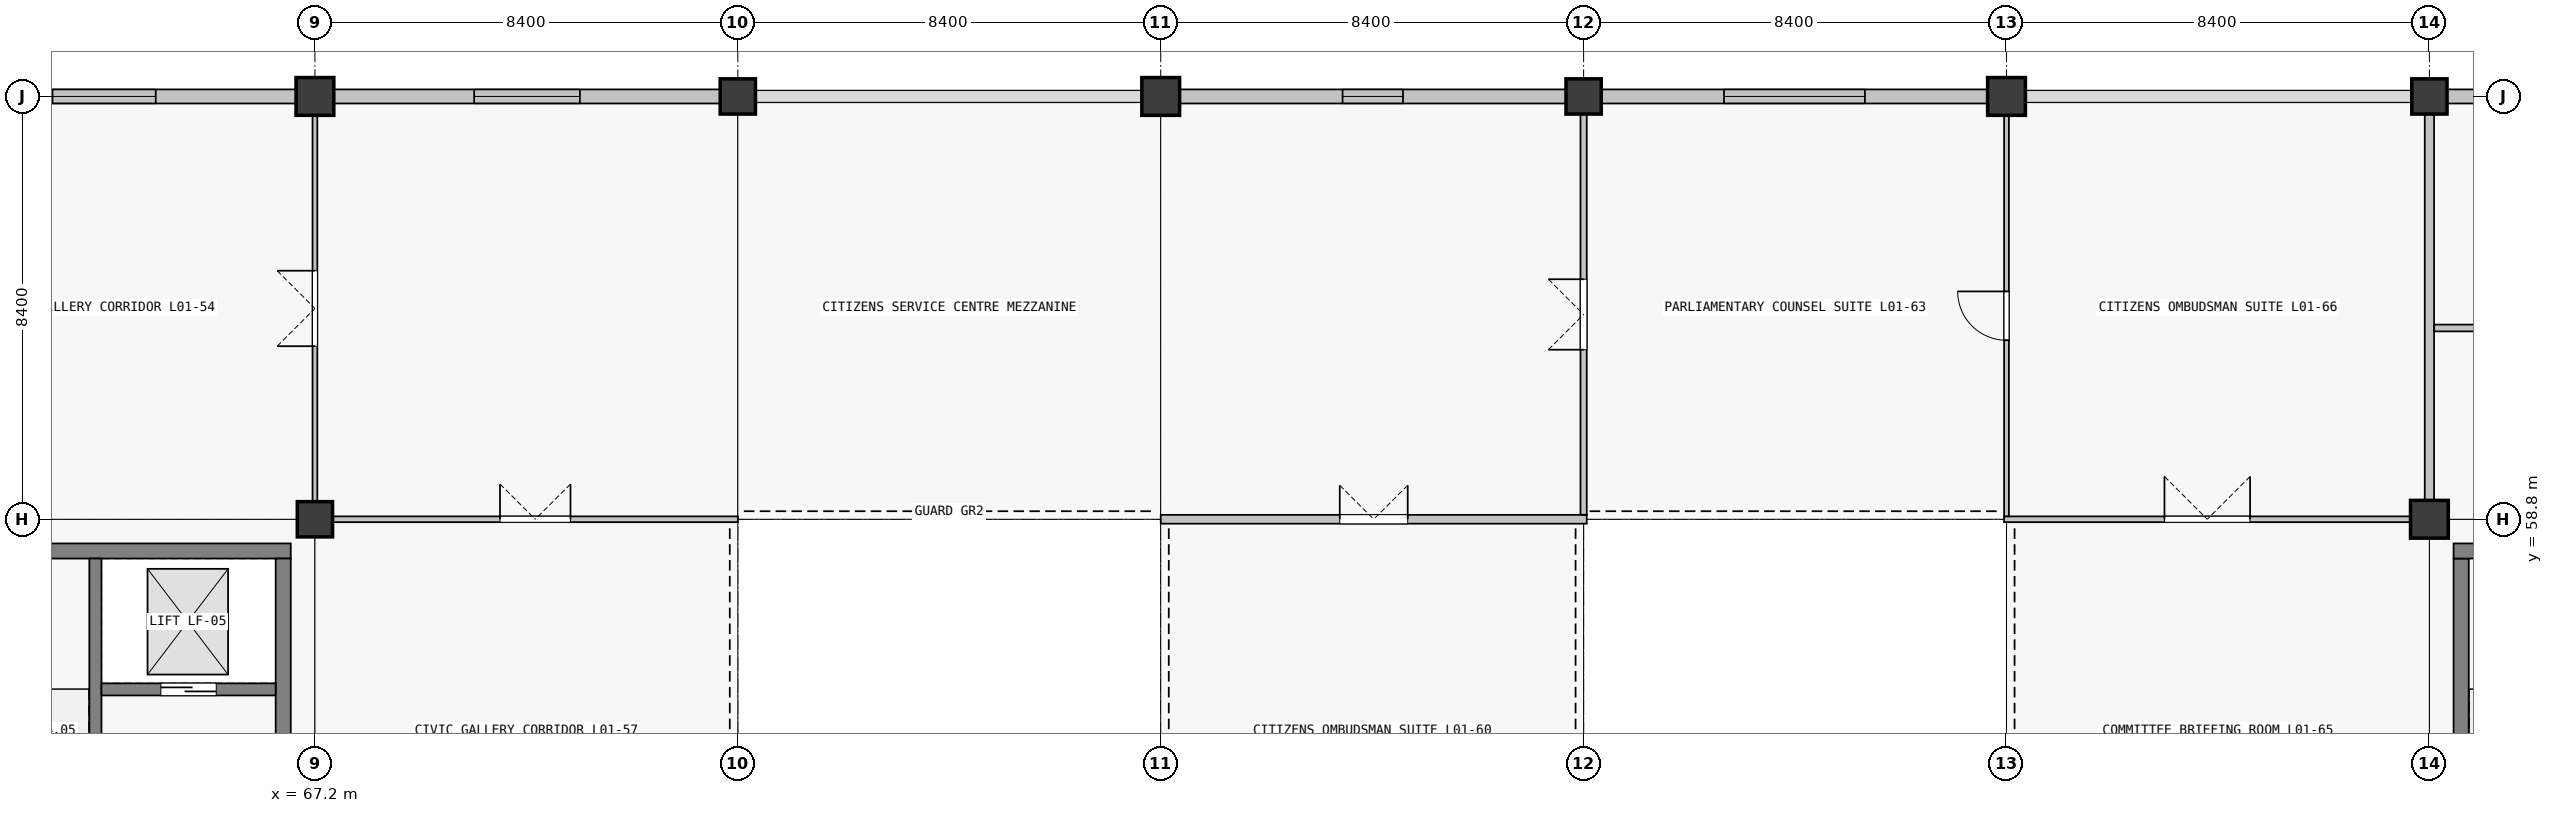
"""IFC4 building model, lengths in metres.
Left out: names, types, materials, properties, quantities, classifications, styles, units other than length and angle.
Written with IfcOpenShell. Run it as: python <this file> out.ifc"""

import sys

from ifc_helpers import new_model, si_unit, direction, frame, frame_2d, origin, origin_2d, place, context, subcontext, project, spatial, rectangle, extrude, element, fill, save


model = new_model("IFC4")
c1 = context("Model", 3, precision=1e-05, world=origin(), true_north=direction((0.0, 1.0)))
c2 = subcontext(c1, "Body", "Model", "MODEL_VIEW")
j1 = project(units=[si_unit("LENGTHUNIT", "METRE"), si_unit("PLANEANGLEUNIT", "RADIAN")], contexts=[c1])
p1 = place(None, origin())
s1 = spatial("IfcSite", under=j1, at=p1, CompositionType="ELEMENT")
p2 = place(p1, origin())
s2 = spatial("IfcBuilding", under=s1, at=p2, CompositionType="ELEMENT")
p3 = place(p2, frame((0.0, 0.0, 5.76)))
s3 = spatial("IfcBuildingStorey", under=s2, at=p3, CompositionType="ELEMENT", Elevation=5.76)
p4 = place(p3, frame((67.2, 58.8, 0.0), z_axis=(0.0, 0.0, 1.0), x_axis=(1.0, 0.0, 0.0)))
e1 = element("IfcColumn", 1, at=p4, inside=s3, PredefinedType="COLUMN", context=c2, shape_type="SweptSolid", body=[
    extrude(rectangle(XDim=0.7, YDim=0.7, at=origin_2d()), origin(), (0.0, 0.0, 1.0), 4.5),
])
p5 = place(p3, frame((67.2, 67.2, 0.0), z_axis=(0.0, 0.0, 1.0), x_axis=(1.0, 0.0, 0.0)))
e2 = element("IfcColumn", 2, at=p5, inside=s3, PredefinedType="COLUMN", context=c2, shape_type="SweptSolid", body=[
    extrude(rectangle(XDim=0.75, YDim=0.75, at=origin_2d()), origin(), (0.0, 0.0, 1.0), 4.5),
])
p6 = place(p3, frame((75.6, 67.2, 0.0), z_axis=(0.0, 0.0, 1.0), x_axis=(1.0, 0.0, 0.0)))
e3 = element("IfcColumn", 3, at=p6, inside=s3, PredefinedType="COLUMN", context=c2, shape_type="SweptSolid", body=[
    extrude(rectangle(XDim=0.7, YDim=0.7, at=origin_2d()), origin(), (0.0, 0.0, 1.0), 4.5),
])
p7 = place(p3, frame((84.0, 67.2, 0.0), z_axis=(0.0, 0.0, 1.0), x_axis=(1.0, 0.0, 0.0)))
e4 = element("IfcColumn", 4, at=p7, inside=s3, PredefinedType="COLUMN", context=c2, shape_type="SweptSolid", body=[
    extrude(rectangle(XDim=0.75, YDim=0.75, at=origin_2d()), origin(), (0.0, 0.0, 1.0), 4.5),
])
p8 = place(p3, frame((92.4, 67.2, 0.0), z_axis=(0.0, 0.0, 1.0), x_axis=(1.0, 0.0, 0.0)))
e5 = element("IfcColumn", 5, at=p8, inside=s3, PredefinedType="COLUMN", context=c2, shape_type="SweptSolid", body=[
    extrude(rectangle(XDim=0.7, YDim=0.7, at=origin_2d()), origin(), (0.0, 0.0, 1.0), 4.5),
])
for number, where, z_axis, x_axis in (
    (6, (100.8, 67.2, 0.0), (0.0, 0.0, 1.0), (1.0, 0.0, 0.0)),
    (7, (109.2, 58.8, 0.0), (0.0, 0.0, 1.0), (1.0, 0.0, 0.0)),
):
    element("IfcColumn", number, at=place(p3, frame(where, z_axis=z_axis, x_axis=x_axis)), inside=s3, PredefinedType="COLUMN", context=c2, shape_type="SweptSolid", body=[
        extrude(rectangle(XDim=0.75, YDim=0.75, at=origin_2d()), origin(), (0.0, 0.0, 1.0), 4.5),
    ])
p9 = place(p3, frame((109.2, 67.2, 0.0), z_axis=(0.0, 0.0, 1.0), x_axis=(1.0, 0.0, 0.0)))
e8 = element("IfcColumn", 8, at=p9, inside=s3, PredefinedType="COLUMN", context=c2, shape_type="SweptSolid", body=[
    extrude(rectangle(XDim=0.7, YDim=0.7, at=origin_2d()), origin(), (0.0, 0.0, 1.0), 4.5),
])
p10 = place(p3, frame((59.201, 67.2, 0.0), z_axis=(0.0, 0.0, 1.0), x_axis=(1.0, 0.0, 0.0)))
e9 = element("IfcWall", 9, at=p10, inside=s3, PredefinedType="SOLIDWALL", context=c2, shape_type="SweptSolid", body=[
    extrude(rectangle(XDim=7.623, YDim=0.28, at=frame_2d((3.812, 0.0))), origin(), (0.0, 0.0, 1.0), 3.4),
])
p11 = place(p10, frame((2.787, 0.0, 0.9)))
e10 = element("IfcOpeningElement", 10, at=p11, cuts=e9, PredefinedType="OPENING", context=c2, shape_type="SweptSolid", body=[
    extrude(rectangle(XDim=2.05, YDim=1.45, at=frame_2d((1.025, 0.725))), frame((0.0, 0.14, 0.0), z_axis=(0.0, -1.0, 0.0), x_axis=(1.0, 0.0, 0.0)), (0.0, 0.0, 1.0), 0.28),
])
p12 = place(p3, frame((67.576, 67.2, 0.0), z_axis=(0.0, 0.0, 1.0), x_axis=(1.0, 0.0, 0.0)))
e11 = element("IfcWall", 11, at=p12, inside=s3, PredefinedType="SOLIDWALL", context=c2, shape_type="SweptSolid", body=[
    extrude(rectangle(XDim=7.673, YDim=0.28, at=frame_2d((3.836, 0.0))), origin(), (0.0, 0.0, 1.0), 3.4),
])
p13 = place(p12, frame((2.787, 0.0, 0.9)))
e12 = element("IfcOpeningElement", 12, at=p13, cuts=e11, PredefinedType="OPENING", context=c2, shape_type="SweptSolid", body=[
    extrude(rectangle(XDim=2.1, YDim=1.8, at=frame_2d((1.05, 0.9))), frame((0.0, 0.14, 0.0), z_axis=(0.0, -1.0, 0.0), x_axis=(1.0, 0.0, 0.0)), (0.0, 0.0, 1.0), 0.28),
])
p14 = place(p3, frame((84.376, 67.2, 0.0), z_axis=(0.0, 0.0, 1.0), x_axis=(1.0, 0.0, 0.0)))
e13 = element("IfcWall", 13, at=p14, inside=s3, PredefinedType="SOLIDWALL", context=c2, shape_type="SweptSolid", body=[
    extrude(rectangle(XDim=7.673, YDim=0.28, at=frame_2d((3.836, 0.0))), origin(), (0.0, 0.0, 1.0), 3.4),
])
p15 = place(p14, frame((3.236, 0.0, 0.9)))
e14 = element("IfcOpeningElement", 14, at=p15, cuts=e13, PredefinedType="OPENING", context=c2, shape_type="SweptSolid", body=[
    extrude(rectangle(XDim=1.2, YDim=2.1, at=frame_2d((0.6, 1.05))), frame((0.0, 0.14, 0.0), z_axis=(0.0, -1.0, 0.0), x_axis=(1.0, 0.0, 0.0)), (0.0, 0.0, 1.0), 0.28),
])
p16 = place(p3, frame((92.751, 67.2, 0.0), z_axis=(0.0, 0.0, 1.0), x_axis=(1.0, 0.0, 0.0)))
e15 = element("IfcWall", 15, at=p16, inside=s3, PredefinedType="SOLIDWALL", context=c2, shape_type="SweptSolid", body=[
    extrude(rectangle(XDim=7.673, YDim=0.28, at=frame_2d((3.836, 0.0))), origin(), (0.0, 0.0, 1.0), 3.4),
])
p17 = place(p16, frame((2.437, 0.0, 0.9)))
e16 = element("IfcOpeningElement", 16, at=p17, cuts=e15, PredefinedType="OPENING", context=c2, shape_type="SweptSolid", body=[
    extrude(rectangle(XDim=2.8, YDim=1.75, at=frame_2d((1.4, 0.875))), frame((0.0, 0.14, 0.0), z_axis=(0.0, -1.0, 0.0), x_axis=(1.0, 0.0, 0.0)), (0.0, 0.0, 1.0), 0.28),
])
p18 = place(p3, frame((109.551, 67.2, 0.0), z_axis=(0.0, 0.0, 1.0), x_axis=(1.0, 0.0, 0.0)))
e17 = element("IfcWall", 17, at=p18, inside=s3, PredefinedType="SOLIDWALL", context=c2, shape_type="SweptSolid", body=[
    extrude(rectangle(XDim=7.723, YDim=0.28, at=frame_2d((3.861, 0.0))), origin(), (0.0, 0.0, 1.0), 3.4),
])
p19 = place(p18, frame((3.162, 0.0, 0.9)))
e18 = element("IfcOpeningElement", 18, at=p19, cuts=e17, PredefinedType="OPENING", context=c2, shape_type="SweptSolid", body=[
    extrude(rectangle(XDim=1.4, YDim=1.75, at=frame_2d((0.7, 0.875))), frame((0.0, 0.14, 0.0), z_axis=(0.0, -1.0, 0.0), x_axis=(1.0, 0.0, 0.0)), (0.0, 0.0, 1.0), 0.28),
])
p20 = place(p3, frame((59.28, 58.17, 0.0), z_axis=(0.0, 0.0, 1.0), x_axis=(1.0, 0.0, 0.0)))
e19 = element("IfcWall", 19, at=p20, inside=s3, PredefinedType="SHEAR", context=c2, shape_type="SweptSolid", body=[
    extrude(rectangle(XDim=7.44, YDim=0.3, at=frame_2d((3.72, 0.0))), origin(), (0.0, 0.0, 1.0), 4.5),
])
p21 = place(p3, frame((66.57, 58.02, 0.0), z_axis=(0.0, 0.0, 1.0), x_axis=(0.0, -1.0, 0.0)))
e20 = element("IfcWall", 20, at=p21, inside=s3, PredefinedType="SHEAR", context=c2, shape_type="SweptSolid", body=[
    extrude(rectangle(XDim=6.84, YDim=0.3, at=frame_2d((3.42, 0.0))), origin(), (0.0, 0.0, 1.0), 4.5),
])
p22 = place(p21, frame((3.97, 0.0, 0.0)))
e21 = element("IfcOpeningElement", 21, at=p22, cuts=e20, PredefinedType="OPENING", context=c2, shape_type="SweptSolid", body=[
    extrude(rectangle(XDim=1.5, YDim=2.15, at=frame_2d((0.75, 1.075))), frame((0.0, 0.15, 0.0), z_axis=(0.0, -1.0, 0.0), x_axis=(1.0, 0.0, 0.0)), (0.0, 0.0, 1.0), 0.3),
])
p23 = place(p3, frame((62.84, 51.18, 0.0), z_axis=(0.0, 0.0, 1.0), x_axis=(0.0, 1.0, 0.0)))
e22 = element("IfcWall", 22, at=p23, inside=s3, PredefinedType="SHEAR", context=c2, shape_type="SweptSolid", body=[
    extrude(rectangle(XDim=6.84, YDim=0.24, at=frame_2d((3.42, 0.0))), origin(), (0.0, 0.0, 1.0), 4.5),
])
p24 = place(p23, frame((0.12, 0.0, 0.0)))
e23 = element("IfcOpeningElement", 23, at=p24, cuts=e22, PredefinedType="OPENING", context=c2, shape_type="SweptSolid", body=[
    extrude(rectangle(XDim=1.0, YDim=2.15, at=frame_2d((0.5, 1.075))), frame((0.0, 0.12, 0.0), z_axis=(0.0, -1.0, 0.0), x_axis=(1.0, 0.0, 0.0)), (0.0, 0.0, 1.0), 0.24),
])
p25 = place(p3, frame((62.96, 55.42, 0.0), z_axis=(0.0, 0.0, 1.0), x_axis=(1.0, 0.0, 0.0)))
e24 = element("IfcWall", 24, at=p25, inside=s3, PredefinedType="SHEAR", context=c2, shape_type="SweptSolid", body=[
    extrude(rectangle(XDim=3.46, YDim=0.24, at=frame_2d((1.73, 0.0))), origin(), (0.0, 0.0, 1.0), 4.5),
])
p26 = place(p25, frame((1.18, 0.0, 0.0)))
e25 = element("IfcOpeningElement", 25, at=p26, cuts=e24, PredefinedType="OPENING", context=c2, shape_type="SweptSolid", body=[
    extrude(rectangle(XDim=1.1, YDim=2.15, at=frame_2d((0.55, 1.075))), frame((0.0, 0.12, 0.0), z_axis=(0.0, -1.0, 0.0), x_axis=(1.0, 0.0, 0.0)), (0.0, 0.0, 1.0), 0.24),
])
p27 = place(p3, frame((109.83, 51.18, 0.0), z_axis=(0.0, 0.0, 1.0), x_axis=(0.0, 1.0, 0.0)))
e26 = element("IfcWall", 26, at=p27, inside=s3, PredefinedType="SHEAR", context=c2, shape_type="SweptSolid", body=[
    extrude(rectangle(XDim=6.84, YDim=0.3, at=frame_2d((3.42, 0.0))), origin(), (0.0, 0.0, 1.0), 4.5),
])
p28 = place(p3, frame((109.68, 58.17, 0.0), z_axis=(0.0, 0.0, 1.0), x_axis=(1.0, 0.0, 0.0)))
e27 = element("IfcWall", 27, at=p28, inside=s3, PredefinedType="SHEAR", context=c2, shape_type="SweptSolid", body=[
    extrude(rectangle(XDim=7.44, YDim=0.3, at=frame_2d((3.72, 0.0))), origin(), (0.0, 0.0, 1.0), 4.5),
])
p29 = place(p3, frame((67.552, 58.8, 0.0), z_axis=(0.0, 0.0, 1.0), x_axis=(1.0, 0.0, 0.0)))
e28 = element("IfcWall", 28, at=p29, inside=s3, PredefinedType="PARTITIONING", context=c2, shape_type="SweptSolid", body=[
    extrude(rectangle(XDim=8.048, YDim=0.115, at=frame_2d((4.024, 0.0))), origin(), (0.0, 0.0, 1.0), 2.4),
])
p30 = place(p29, frame((3.324, 0.0, 0.0)))
e29 = element("IfcOpeningElement", 29, at=p30, cuts=e28, PredefinedType="OPENING", context=c2, shape_type="SweptSolid", body=[
    extrude(rectangle(XDim=1.4, YDim=2.22, at=frame_2d((0.7, 1.11))), frame((0.0, 0.058, 0.0), z_axis=(0.0, -1.0, 0.0), x_axis=(1.0, 0.0, 0.0)), (0.0, 0.0, 1.0), 0.115),
])
p31 = place(p3, frame((84.0, 58.8, 0.0), z_axis=(0.0, 0.0, 1.0), x_axis=(1.0, 0.0, 0.0)))
e30 = element("IfcWall", 30, at=p31, inside=s3, PredefinedType="PARTITIONING", context=c2, shape_type="SweptSolid", body=[
    extrude(rectangle(XDim=8.462, YDim=0.175, at=frame_2d((4.231, 0.0))), origin(), (0.0, 0.0, 1.0), 2.4),
])
p32 = place(p31, frame((3.556, 0.0, 0.0)))
e31 = element("IfcOpeningElement", 31, at=p32, cuts=e30, PredefinedType="OPENING", context=c2, shape_type="SweptSolid", body=[
    extrude(rectangle(XDim=1.35, YDim=2.2, at=frame_2d((0.675, 1.1))), frame((0.0, 0.087, 0.0), z_axis=(0.0, -1.0, 0.0), x_axis=(1.0, 0.0, 0.0)), (0.0, 0.0, 1.0), 0.175),
])
p33 = place(p3, frame((100.752, 58.8, 0.0), z_axis=(0.0, 0.0, 1.0), x_axis=(1.0, 0.0, 0.0)))
e32 = element("IfcWall", 32, at=p33, inside=s3, PredefinedType="PARTITIONING", context=c2, shape_type="SweptSolid", body=[
    extrude(rectangle(XDim=8.071, YDim=0.115, at=frame_2d((4.035, 0.0))), origin(), (0.0, 0.0, 1.0), 2.4),
])
p34 = place(p33, frame((3.185, 0.0, 0.0)))
e33 = element("IfcOpeningElement", 33, at=p34, cuts=e32, PredefinedType="OPENING", context=c2, shape_type="SweptSolid", body=[
    extrude(rectangle(XDim=1.7, YDim=2.22, at=frame_2d((0.85, 1.11))), frame((0.0, 0.058, 0.0), z_axis=(0.0, -1.0, 0.0), x_axis=(1.0, 0.0, 0.0)), (0.0, 0.0, 1.0), 0.115),
])
p35 = place(p3, frame((67.2, 59.152, 0.0), z_axis=(0.0, 0.0, 1.0), x_axis=(0.0, 1.0, 0.0)))
e34 = element("IfcWall", 34, at=p35, inside=s3, PredefinedType="PARTITIONING", context=c2, shape_type="SweptSolid", body=[
    extrude(rectangle(XDim=7.671, YDim=0.095, at=frame_2d((3.835, 0.0))), origin(), (0.0, 0.0, 1.0), 2.4),
])
p36 = place(p35, frame((3.086, 0.0, 0.0)))
e35 = element("IfcOpeningElement", 35, at=p36, cuts=e34, PredefinedType="OPENING", context=c2, shape_type="SweptSolid", body=[
    extrude(rectangle(XDim=1.5, YDim=2.22, at=frame_2d((0.75, 1.11))), frame((0.0, 0.047, 0.0), z_axis=(0.0, -1.0, 0.0), x_axis=(1.0, 0.0, 0.0)), (0.0, 0.0, 1.0), 0.095),
])
p37 = place(p3, frame((92.4, 58.889, 0.0), z_axis=(0.0, 0.0, 1.0), x_axis=(0.0, 1.0, 0.0)))
e36 = element("IfcWall", 36, at=p37, inside=s3, PredefinedType="PARTITIONING", context=c2, shape_type="SweptSolid", body=[
    extrude(rectangle(XDim=7.958, YDim=0.125, at=frame_2d((3.979, 0.0))), origin(), (0.0, 0.0, 1.0), 2.4),
])
p38 = place(p37, frame((3.279, 0.0, 0.0)))
e37 = element("IfcOpeningElement", 37, at=p38, cuts=e36, PredefinedType="OPENING", context=c2, shape_type="SweptSolid", body=[
    extrude(rectangle(XDim=1.4, YDim=2.22, at=frame_2d((0.7, 1.11))), frame((0.0, 0.062, 0.0), z_axis=(0.0, -1.0, 0.0), x_axis=(1.0, 0.0, 0.0)), (0.0, 0.0, 1.0), 0.125),
])
p39 = place(p3, frame((100.8, 58.86, 0.0), z_axis=(0.0, 0.0, 1.0), x_axis=(0.0, 1.0, 0.0)))
e38 = element("IfcWall", 38, at=p39, inside=s3, PredefinedType="PARTITIONING", context=c2, shape_type="SweptSolid", body=[
    extrude(rectangle(XDim=7.963, YDim=0.095, at=frame_2d((3.982, 0.0))), origin(), (0.0, 0.0, 1.0), 2.4),
])
p40 = place(p39, frame((3.497, 0.0, 0.0)))
e39 = element("IfcOpeningElement", 39, at=p40, cuts=e38, PredefinedType="OPENING", context=c2, shape_type="SweptSolid", body=[
    extrude(rectangle(XDim=0.97, YDim=2.12, at=frame_2d((0.485, 1.06))), frame((0.0, 0.047, 0.0), z_axis=(0.0, -1.0, 0.0), x_axis=(1.0, 0.0, 0.0)), (0.0, 0.0, 1.0), 0.095),
])
p41 = place(p3, frame((109.2, 59.177, 0.0), z_axis=(0.0, 0.0, 1.0), x_axis=(0.0, 1.0, 0.0)))
e40 = element("IfcWall", 40, at=p41, inside=s3, PredefinedType="PARTITIONING", context=c2, shape_type="SweptSolid", body=[
    extrude(rectangle(XDim=7.671, YDim=0.185, at=frame_2d((3.835, 0.0))), origin(), (0.0, 0.0, 1.0), 2.4),
])
p42 = place(p3, frame((109.294, 62.6, 0.0), z_axis=(0.0, 0.0, 1.0), x_axis=(1.0, 0.0, 0.0)))
e41 = element("IfcWall", 41, at=p42, inside=s3, PredefinedType="PARTITIONING", context=c2, shape_type="SweptSolid", body=[
    extrude(rectangle(XDim=8.226, YDim=0.135, at=frame_2d((4.113, 0.0))), origin(), (0.0, 0.0, 1.0), 2.4),
])
p43 = place(p11, origin())
e42 = element("IfcWindow", 42, at=p43, inside=s3, PartitioningType="SINGLE_PANEL", PredefinedType="WINDOW", context=c2, shape_type="SweptSolid", body=[
    extrude(rectangle(XDim=2.05, YDim=1.45, at=frame_2d((1.025, 0.725))), frame((0.0, 0.03, 0.0), z_axis=(0.0, -1.0, 0.0), x_axis=(1.0, 0.0, 0.0)), (0.0, 0.0, 1.0), 0.06),
])
fill(e10, e42)
p44 = place(p13, origin())
e43 = element("IfcWindow", 43, at=p44, inside=s3, PartitioningType="SINGLE_PANEL", PredefinedType="WINDOW", context=c2, shape_type="SweptSolid", body=[
    extrude(rectangle(XDim=2.1, YDim=1.8, at=frame_2d((1.05, 0.9))), frame((0.0, 0.03, 0.0), z_axis=(0.0, -1.0, 0.0), x_axis=(1.0, 0.0, 0.0)), (0.0, 0.0, 1.0), 0.06),
])
fill(e12, e43)
p45 = place(p15, origin())
e44 = element("IfcWindow", 44, at=p45, inside=s3, PartitioningType="SINGLE_PANEL", PredefinedType="WINDOW", context=c2, shape_type="SweptSolid", body=[
    extrude(rectangle(XDim=1.2, YDim=2.1, at=frame_2d((0.6, 1.05))), frame((0.0, 0.03, 0.0), z_axis=(0.0, -1.0, 0.0), x_axis=(1.0, 0.0, 0.0)), (0.0, 0.0, 1.0), 0.06),
])
fill(e14, e44)
p46 = place(p17, origin())
e45 = element("IfcWindow", 45, at=p46, inside=s3, PartitioningType="SINGLE_PANEL", PredefinedType="WINDOW", context=c2, shape_type="SweptSolid", body=[
    extrude(rectangle(XDim=2.8, YDim=1.75, at=frame_2d((1.4, 0.875))), frame((0.0, 0.03, 0.0), z_axis=(0.0, -1.0, 0.0), x_axis=(1.0, 0.0, 0.0)), (0.0, 0.0, 1.0), 0.06),
])
fill(e16, e45)
p47 = place(p26, origin())
e46 = element("IfcDoor", 46, at=p47, inside=s3, OperationType="DOUBLE_DOOR_SLIDING", PredefinedType="DOOR", context=c2, shape_type="SweptSolid", body=[
    extrude(rectangle(XDim=1.1, YDim=2.15, at=frame_2d((0.55, 1.075))), frame((0.0, 0.025, 0.0), z_axis=(0.0, -1.0, 0.0), x_axis=(1.0, 0.0, 0.0)), (0.0, 0.0, 1.0), 0.05),
])
fill(e25, e46)
p48 = place(p30, origin())
e47 = element("IfcDoor", 47, at=p48, inside=s3, OperationType="DOUBLE_DOOR_SINGLE_SWING", PredefinedType="DOOR", context=c2, shape_type="SweptSolid", body=[
    extrude(rectangle(XDim=1.4, YDim=2.22, at=frame_2d((0.7, 1.11))), frame((0.0, 0.025, 0.0), z_axis=(0.0, -1.0, 0.0), x_axis=(1.0, 0.0, 0.0)), (0.0, 0.0, 1.0), 0.05),
])
fill(e29, e47)
p49 = place(p32, origin())
e48 = element("IfcDoor", 48, at=p49, inside=s3, OperationType="DOUBLE_DOOR_SINGLE_SWING", PredefinedType="DOOR", context=c2, shape_type="SweptSolid", body=[
    extrude(rectangle(XDim=1.35, YDim=2.2, at=frame_2d((0.675, 1.1))), frame((0.0, 0.025, 0.0), z_axis=(0.0, -1.0, 0.0), x_axis=(1.0, 0.0, 0.0)), (0.0, 0.0, 1.0), 0.05),
])
fill(e31, e48)
p50 = place(p34, origin())
e49 = element("IfcDoor", 49, at=p50, inside=s3, OperationType="DOUBLE_DOOR_SINGLE_SWING", PredefinedType="DOOR", context=c2, shape_type="SweptSolid", body=[
    extrude(rectangle(XDim=1.7, YDim=2.22, at=frame_2d((0.85, 1.11))), frame((0.0, 0.025, 0.0), z_axis=(0.0, -1.0, 0.0), x_axis=(1.0, 0.0, 0.0)), (0.0, 0.0, 1.0), 0.05),
])
fill(e33, e49)
p51 = place(p36, origin())
e50 = element("IfcDoor", 50, at=p51, inside=s3, OperationType="DOUBLE_DOOR_SINGLE_SWING", PredefinedType="DOOR", context=c2, shape_type="SweptSolid", body=[
    extrude(rectangle(XDim=1.5, YDim=2.22, at=frame_2d((0.75, 1.11))), frame((0.0, 0.025, 0.0), z_axis=(0.0, -1.0, 0.0), x_axis=(1.0, 0.0, 0.0)), (0.0, 0.0, 1.0), 0.05),
])
fill(e35, e50)
p52 = place(p38, origin())
e51 = element("IfcDoor", 51, at=p52, inside=s3, OperationType="DOUBLE_DOOR_SINGLE_SWING", PredefinedType="DOOR", context=c2, shape_type="SweptSolid", body=[
    extrude(rectangle(XDim=1.4, YDim=2.22, at=frame_2d((0.7, 1.11))), frame((0.0, 0.025, 0.0), z_axis=(0.0, -1.0, 0.0), x_axis=(1.0, 0.0, 0.0)), (0.0, 0.0, 1.0), 0.05),
])
fill(e37, e51)
p53 = place(p40, origin())
e52 = element("IfcDoor", 52, at=p53, inside=s3, OperationType="SINGLE_SWING_RIGHT", PredefinedType="DOOR", context=c2, shape_type="SweptSolid", body=[
    extrude(rectangle(XDim=0.97, YDim=2.12, at=frame_2d((0.485, 1.06))), frame((0.0, 0.025, 0.0), z_axis=(0.0, -1.0, 0.0), x_axis=(1.0, 0.0, 0.0)), (0.0, 0.0, 1.0), 0.05),
])
fill(e39, e52)
save(model, sys.argv[1])
